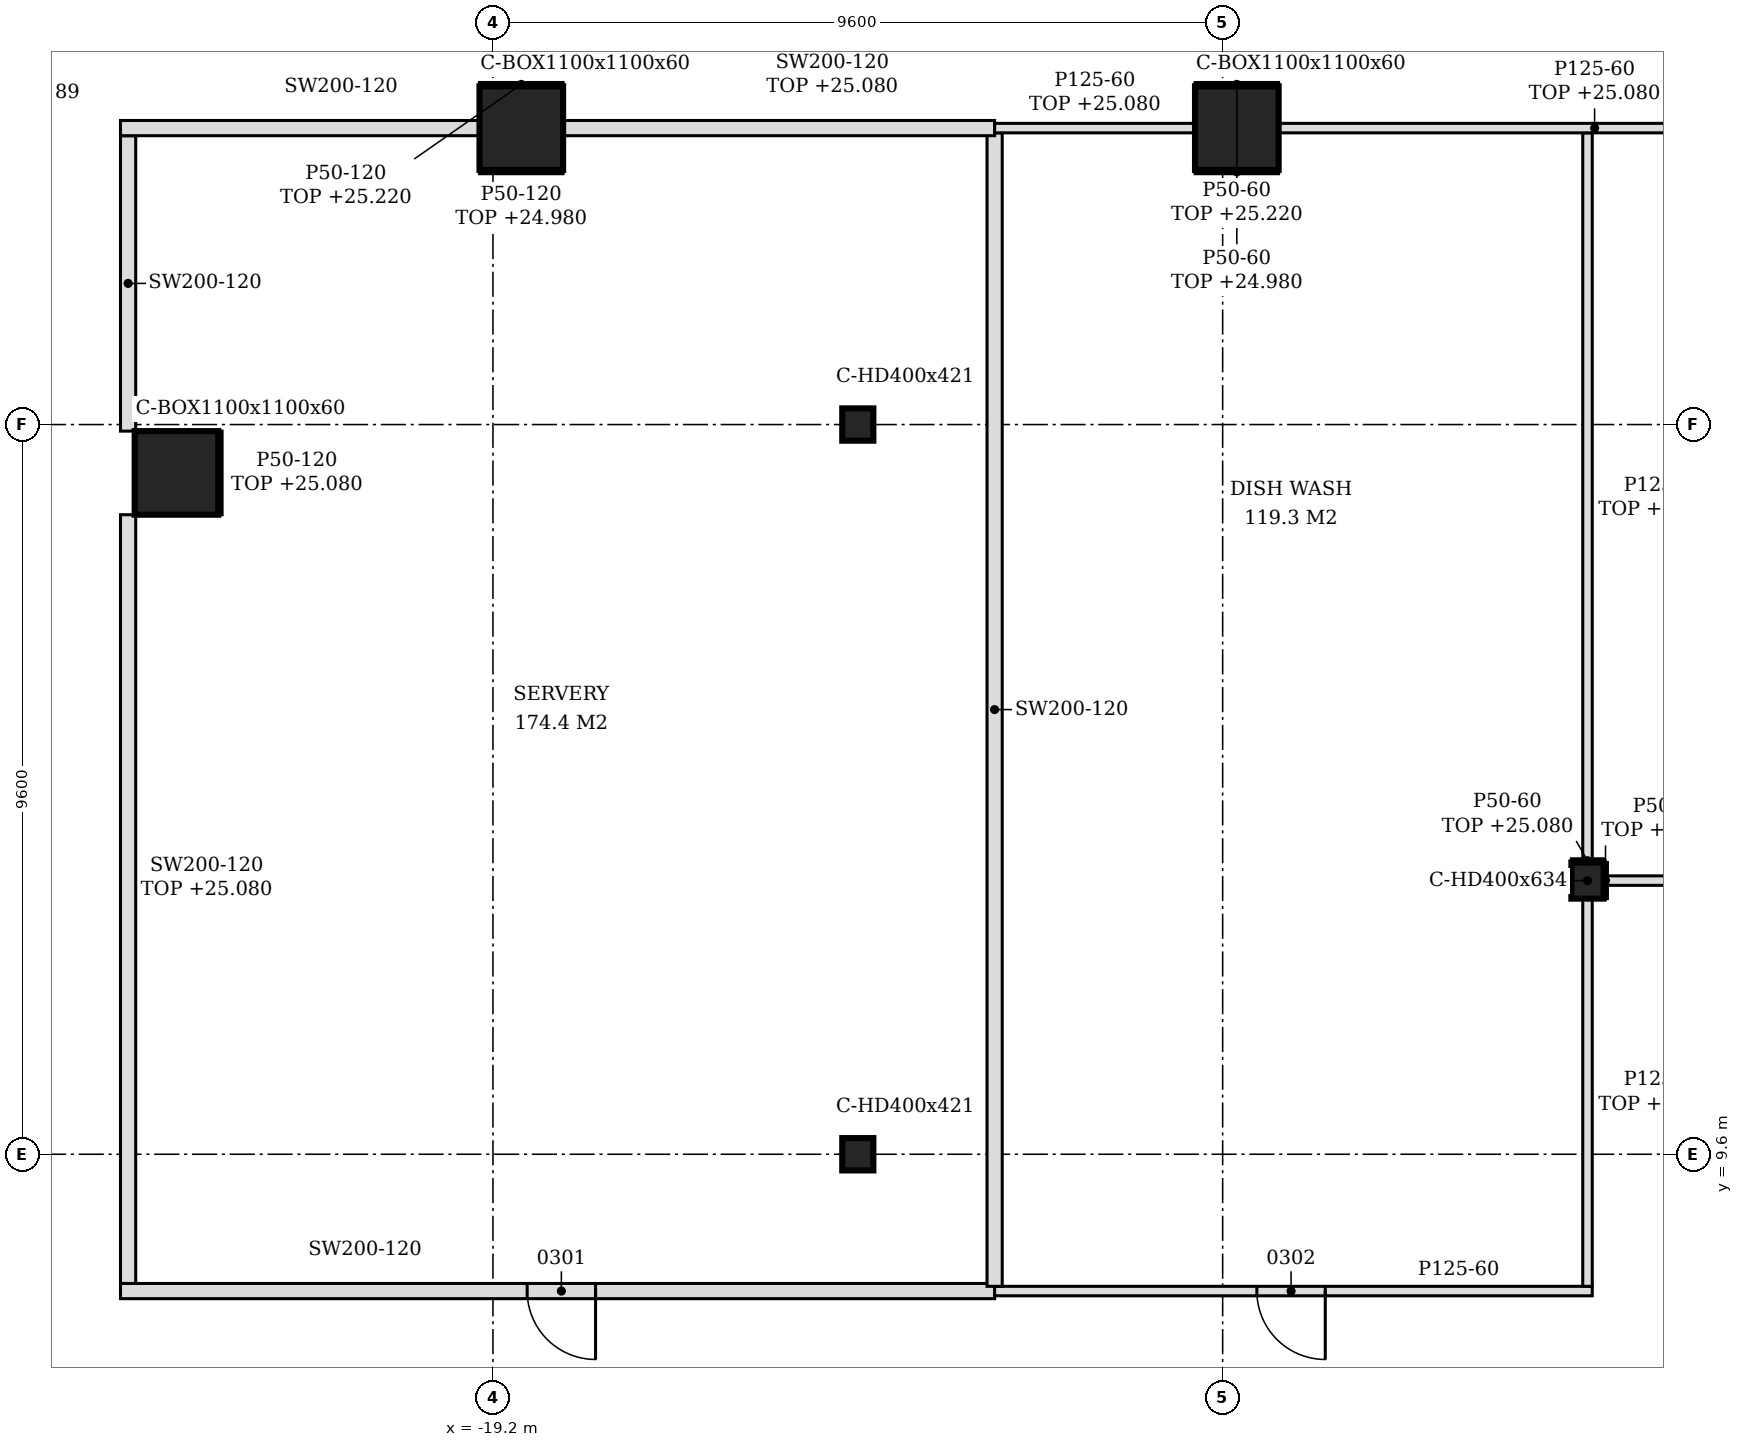
"""IFC4 building model, lengths in metres.
Left out: names, types, materials, properties, quantities, classifications, styles, units other than length and angle.
Written with IfcOpenShell. Run it as: python <this file> out.ifc"""

import sys

from ifc_helpers import new_model, si_unit, direction, frame, frame_2d, origin, origin_2d, place, context, subcontext, project, spatial, polyline, rectangle, hollow_rectangle, i_section, outline, extrude, element, fill, save


model = new_model("IFC4")
c1 = context("Model", 3, precision=1e-05, world=origin(), true_north=direction((0.0, 1.0)))
c2 = subcontext(c1, "Body", "Model", "MODEL_VIEW")
j1 = project(units=[si_unit("LENGTHUNIT", "METRE"), si_unit("PLANEANGLEUNIT", "RADIAN")], contexts=[c1])
p1 = place(None, origin())
s1 = spatial("IfcSite", under=j1, at=p1, CompositionType="ELEMENT")
p2 = place(p1, origin())
s2 = spatial("IfcBuilding", under=s1, at=p2, CompositionType="ELEMENT")
p3 = place(p2, frame((0.0, 0.0, 21.0)))
s3 = spatial("IfcBuildingStorey", under=s2, at=p3, CompositionType="ELEMENT", Elevation=21.0)
for number, where, z_axis, x_axis in (
    (1, (-9.414, 23.1, -0.2), (0.0, 0.0, 1.0), (1.0, 0.0, 0.0)),
    (2, (-18.827, 23.1, -0.2), (0.0, 0.0, 1.0), (1.0, 0.0, 0.0)),
    (3, (-23.364, 18.564, -0.2), (0.0, 0.0, 1.0), (1.0, 0.0, 0.0)),
):
    element("IfcColumn", number, at=place(p3, frame(where, z_axis=z_axis, x_axis=x_axis)), inside=s3, PredefinedType="COLUMN", context=c2, shape_type="SweptSolid", body=[
        extrude(hollow_rectangle(XDim=1.1, YDim=1.1, WallThickness=0.06, at=origin_2d()), origin(), (0.0, 0.0, 1.0), 4.8),
    ])
p4 = place(p3, frame((-4.8, 13.2, -0.2), z_axis=(0.0, 0.0, 1.0), x_axis=(1.0, 0.0, 0.0)))
e4 = element("IfcColumn", 4, at=p4, inside=s3, PredefinedType="COLUMN", context=c2, shape_type="SweptSolid", body=[
    extrude(i_section(OverallWidth=0.424, OverallDepth=0.474, WebThickness=0.048, FlangeThickness=0.077, FilletRadius=0.015, at=origin_2d()), origin(), (0.0, 0.0, 1.0), 4.8),
])
for number, where, z_axis, x_axis in (
    (5, (-14.4, 9.6, -0.2), (0.0, 0.0, 1.0), (1.0, 0.0, 0.0)),
    (6, (-14.4, 19.2, -0.2), (0.0, 0.0, 1.0), (1.0, 0.0, 0.0)),
):
    element("IfcColumn", number, at=place(p3, frame(where, z_axis=z_axis, x_axis=x_axis)), inside=s3, PredefinedType="COLUMN", context=c2, shape_type="SweptSolid", body=[
        extrude(i_section(OverallWidth=0.409, OverallDepth=0.425, WebThickness=0.033, FlangeThickness=0.052, FilletRadius=0.015, at=origin_2d()), origin(), (0.0, 0.0, 1.0), 4.8),
    ])
p5 = place(p3, frame((-24.1, 7.8, 0.0), z_axis=(0.0, 0.0, 1.0), x_axis=(1.0, 0.0, 0.0)))
e7 = element("IfcWall", 7, at=p5, inside=s3, PredefinedType="PARTITIONING", context=c2, shape_type="SweptSolid", body=[
    extrude(outline(polyline([(0.0, 0.0), (11.5, 0.0), (11.5, 4.6), (9.8, 4.6), (9.798, 4.08), (9.6, 4.08), (9.598, 4.6), (5.0, 4.6), (4.998, 4.08), (4.8, 4.08), (4.798, 4.6), (0.2, 4.6), (0.198, 4.08), (0.0, 4.08), (0.0, 0.0)])), frame((0.0, 0.1, 0.0), z_axis=(0.0, -1.0, 0.0), x_axis=(1.0, 0.0, 0.0)), (0.0, 0.0, 1.0), 0.2),
])
p6 = place(p5, frame((5.35, 0.0, 0.0)))
e8 = element("IfcOpeningElement", 8, at=p6, cuts=e7, PredefinedType="OPENING", context=c2, shape_type="SweptSolid", body=[
    extrude(rectangle(XDim=0.9, YDim=2.1, at=frame_2d((0.45, 1.05))), frame((0.0, 0.11, 0.0), z_axis=(0.0, -1.0, 0.0), x_axis=(1.0, 0.0, 0.0)), (0.0, 0.0, 1.0), 0.22),
])
p7 = place(p3, frame((-12.6, 7.8, 0.0), z_axis=(0.0, 0.0, 1.0), x_axis=(1.0, 0.0, 0.0)))
e9 = element("IfcWall", 9, at=p7, inside=s3, PredefinedType="PARTITIONING", context=c2, shape_type="SweptSolid", body=[
    extrude(outline(polyline([(0.0, 0.0), (7.863, 0.0), (7.863, 3.98), (7.65, 3.98), (7.648, 4.6), (3.1, 4.6), (3.098, 4.08), (2.9, 4.08), (2.898, 4.6), (0.0, 4.6), (0.0, 0.0)])), frame((0.0, 0.062, 0.0), z_axis=(0.0, -1.0, 0.0), x_axis=(1.0, 0.0, 0.0)), (0.0, 0.0, 1.0), 0.125),
])
p8 = place(p7, frame((3.45, 0.0, 0.0)))
e10 = element("IfcOpeningElement", 10, at=p8, cuts=e9, PredefinedType="OPENING", context=c2, shape_type="SweptSolid", body=[
    extrude(rectangle(XDim=0.9, YDim=2.1, at=frame_2d((0.45, 1.05))), frame((0.0, 0.073, 0.0), z_axis=(0.0, -1.0, 0.0), x_axis=(1.0, 0.0, 0.0)), (0.0, 0.0, 1.0), 0.145),
])
p9 = place(p3, frame((-24.0, 7.9, 0.0), z_axis=(0.0, 0.0, 1.0), x_axis=(0.0, 1.0, 0.0)))
e11 = element("IfcWall", 11, at=p9, inside=s3, PredefinedType="PARTITIONING", context=c2, shape_type="SweptSolid", body=[
    extrude(outline(polyline([(0.0, 0.0), (10.114, 0.0), (10.114, 4.08), (1.85, 4.08), (1.848, 3.88), (1.55, 3.88), (1.548, 4.08), (0.0, 4.08), (0.0, 0.0)])), frame((0.0, 0.1, 0.0), z_axis=(0.0, -1.0, 0.0), x_axis=(1.0, 0.0, 0.0)), (0.0, 0.0, 1.0), 0.2),
])
p10 = place(p3, frame((-12.6, 7.863, 0.0), z_axis=(0.0, 0.0, 1.0), x_axis=(0.0, 1.0, 0.0)))
e12 = element("IfcWall", 12, at=p10, inside=s3, PredefinedType="PARTITIONING", context=c2, shape_type="SweptSolid", body=[
    extrude(outline(polyline([(0.0, 0.0), (15.175, 0.0), (15.175, 4.08), (15.087, 4.08), (15.085, 4.6), (1.887, 4.6), (1.885, 4.08), (1.587, 4.08), (1.585, 4.6), (0.0, 4.6), (0.0, 0.0)])), frame((0.0, 0.1, 0.0), z_axis=(0.0, -1.0, 0.0), x_axis=(1.0, 0.0, 0.0)), (0.0, 0.0, 1.0), 0.2),
])
p11 = place(p3, frame((-4.8, 7.863, 0.0), z_axis=(0.0, 0.0, 1.0), x_axis=(0.0, 1.0, 0.0)))
e13 = element("IfcWall", 13, at=p11, inside=s3, PredefinedType="PARTITIONING", context=c2, shape_type="SweptSolid", body=[
    extrude(rectangle(XDim=5.1, YDim=0.125, at=frame_2d((2.55, 0.0))), origin(), (0.0, 0.0, 1.0), 3.98),
])
p12 = place(p3, frame((-4.588, 13.2, 0.0), z_axis=(0.0, 0.0, 1.0), x_axis=(1.0, 0.0, 0.0)))
e14 = element("IfcWall", 14, at=p12, inside=s3, PredefinedType="PARTITIONING", context=c2, shape_type="SweptSolid", body=[
    extrude(rectangle(XDim=11.576, YDim=0.125, at=frame_2d((5.788, 0.0))), origin(), (0.0, 0.0, 1.0), 3.98),
])
p13 = place(p12, frame((4.138, 0.0, 0.0)))
e15 = element("IfcOpeningElement", 15, at=p13, cuts=e14, PredefinedType="OPENING", context=c2, shape_type="SweptSolid", body=[
    extrude(rectangle(XDim=0.9, YDim=2.1, at=frame_2d((0.45, 1.05))), frame((0.0, 0.073, 0.0), z_axis=(0.0, -1.0, 0.0), x_axis=(1.0, 0.0, 0.0)), (0.0, 0.0, 1.0), 0.145),
])
p14 = place(p12, frame((10.143, 0.0, 0.0)))
e16 = element("IfcOpeningElement", 16, at=p14, cuts=e14, PredefinedType="OPENING", context=c2, shape_type="SweptSolid", body=[
    extrude(rectangle(XDim=0.9, YDim=2.1, at=frame_2d((0.45, 1.05))), frame((0.0, 0.073, 0.0), z_axis=(0.0, -1.0, 0.0), x_axis=(1.0, 0.0, 0.0)), (0.0, 0.0, 1.0), 0.145),
])
p15 = place(p3, frame((-4.8, 13.437, 0.0), z_axis=(0.0, 0.0, 1.0), x_axis=(0.0, 1.0, 0.0)))
e17 = element("IfcWall", 17, at=p15, inside=s3, PredefinedType="PARTITIONING", context=c2, shape_type="SweptSolid", body=[
    extrude(rectangle(XDim=9.601, YDim=0.125, at=frame_2d((4.8, 0.0))), origin(), (0.0, 0.0, 1.0), 4.08),
])
p16 = place(p3, frame((-24.0, 19.114, 0.0), z_axis=(0.0, 0.0, 1.0), x_axis=(0.0, 1.0, 0.0)))
e18 = element("IfcWall", 18, at=p16, inside=s3, PredefinedType="PARTITIONING", context=c2, shape_type="SweptSolid", body=[
    extrude(outline(polyline([(0.0, 0.0), (3.886, 0.0), (3.886, 4.6), (0.236, 4.6), (0.234, 3.98), (0.0, 3.98), (0.0, 0.0)])), frame((0.0, 0.1, 0.0), z_axis=(0.0, -1.0, 0.0), x_axis=(1.0, 0.0, 0.0)), (0.0, 0.0, 1.0), 0.2),
])
p17 = place(p3, frame((-24.1, 23.1, 0.0), z_axis=(0.0, 0.0, 1.0), x_axis=(1.0, 0.0, 0.0)))
e19 = element("IfcWall", 19, at=p17, inside=s3, PredefinedType="PARTITIONING", context=c2, shape_type="SweptSolid", body=[
    extrude(rectangle(XDim=4.723, YDim=0.2, at=frame_2d((2.361, 0.0))), origin(), (0.0, 0.0, 1.0), 4.6),
])
p18 = place(p3, frame((-18.277, 23.1, 0.0), z_axis=(0.0, 0.0, 1.0), x_axis=(1.0, 0.0, 0.0)))
e20 = element("IfcWall", 20, at=p18, inside=s3, PredefinedType="PARTITIONING", context=c2, shape_type="SweptSolid", body=[
    extrude(rectangle(XDim=5.677, YDim=0.2, at=frame_2d((2.838, 0.0))), origin(), (0.0, 0.0, 1.0), 4.08),
])
p19 = place(p3, frame((-12.6, 23.1, 0.0), z_axis=(0.0, 0.0, 1.0), x_axis=(1.0, 0.0, 0.0)))
e21 = element("IfcWall", 21, at=p19, inside=s3, PredefinedType="PARTITIONING", context=c2, shape_type="SweptSolid", body=[
    extrude(rectangle(XDim=2.636, YDim=0.125, at=frame_2d((1.318, 0.0))), origin(), (0.0, 0.0, 1.0), 4.08),
])
p20 = place(p3, frame((-8.864, 23.1, 0.0), z_axis=(0.0, 0.0, 1.0), x_axis=(1.0, 0.0, 0.0)))
e22 = element("IfcWall", 22, at=p20, inside=s3, PredefinedType="PARTITIONING", context=c2, shape_type="SweptSolid", body=[
    extrude(rectangle(XDim=8.313, YDim=0.125, at=frame_2d((4.157, 0.0))), origin(), (0.0, 0.0, 1.0), 4.08),
])
p21 = place(p3, frame((-22.789, 18.014, 0.0), z_axis=(0.0, 0.0, 1.0), x_axis=(0.0, 1.0, 0.0)))
e23 = element("IfcWall", 23, at=p21, inside=s3, PredefinedType="PARTITIONING", context=c2, shape_type="SweptSolid", body=[
    extrude(rectangle(XDim=1.1, YDim=0.05, at=frame_2d((0.55, 0.0))), origin(), (0.0, 0.0, 1.0), 4.08),
])
p22 = place(p3, frame((-4.563, 12.963, 0.0), z_axis=(0.0, 0.0, 1.0), x_axis=(0.0, 1.0, 0.0)))
e24 = element("IfcWall", 24, at=p22, inside=s3, PredefinedType="PARTITIONING", context=c2, shape_type="SweptSolid", body=[
    extrude(rectangle(XDim=0.474, YDim=0.05, at=frame_2d((0.237, 0.0))), origin(), (0.0, 0.0, 1.0), 3.98),
])
p23 = place(p3, frame((-5.012, 13.462, 0.0), z_axis=(0.0, 0.0, 1.0), x_axis=(1.0, 0.0, 0.0)))
e25 = element("IfcWall", 25, at=p23, inside=s3, PredefinedType="PARTITIONING", context=c2, shape_type="SweptSolid", body=[
    extrude(rectangle(XDim=0.424, YDim=0.05, at=frame_2d((0.212, 0.0))), origin(), (0.0, 0.0, 1.0), 4.08),
])
p24 = place(p3, frame((-19.377, 22.525, 0.0), z_axis=(0.0, 0.0, 1.0), x_axis=(1.0, 0.0, 0.0)))
e26 = element("IfcWall", 26, at=p24, inside=s3, PredefinedType="PARTITIONING", context=c2, shape_type="SweptSolid", body=[
    extrude(rectangle(XDim=1.1, YDim=0.05, at=frame_2d((0.55, 0.0))), origin(), (0.0, 0.0, 1.0), 3.98),
])
for number, where, z_axis, x_axis in (
    (27, (-19.377, 23.675, 0.0), (0.0, 0.0, 1.0), (1.0, 0.0, 0.0)),
    (28, (-9.964, 23.675, 0.0), (0.0, 0.0, 1.0), (1.0, 0.0, 0.0)),
):
    element("IfcWall", number, at=place(p3, frame(where, z_axis=z_axis, x_axis=x_axis)), inside=s3, PredefinedType="PARTITIONING", context=c2, shape_type="SweptSolid", body=[
        extrude(rectangle(XDim=1.1, YDim=0.05, at=frame_2d((0.55, 0.0))), origin(), (0.0, 0.0, 1.0), 4.22),
    ])
p25 = place(p3, frame((-9.964, 22.525, 0.0), z_axis=(0.0, 0.0, 1.0), x_axis=(1.0, 0.0, 0.0)))
e29 = element("IfcWall", 29, at=p25, inside=s3, PredefinedType="PARTITIONING", context=c2, shape_type="SweptSolid", body=[
    extrude(rectangle(XDim=1.1, YDim=0.05, at=frame_2d((0.55, 0.0))), origin(), (0.0, 0.0, 1.0), 3.98),
])
p26 = place(p6, frame((0.9, 0.0, 0.0), z_axis=(0.0, 0.0, 1.0), x_axis=(-1.0, 0.0, 0.0)))
e30 = element("IfcDoor", 30, at=p26, inside=s3, OperationType="SINGLE_SWING_LEFT", PredefinedType="DOOR", context=c2, shape_type="SweptSolid", body=[
    extrude(rectangle(XDim=0.9, YDim=2.1, at=frame_2d((0.45, 1.05))), frame((0.0, 0.025, 0.0), z_axis=(0.0, -1.0, 0.0), x_axis=(1.0, 0.0, 0.0)), (0.0, 0.0, 1.0), 0.05),
])
fill(e8, e30)
p27 = place(p8, frame((0.9, 0.0, 0.0), z_axis=(0.0, 0.0, 1.0), x_axis=(-1.0, 0.0, 0.0)))
e31 = element("IfcDoor", 31, at=p27, inside=s3, OperationType="SINGLE_SWING_LEFT", PredefinedType="DOOR", context=c2, shape_type="SweptSolid", body=[
    extrude(rectangle(XDim=0.9, YDim=2.1, at=frame_2d((0.45, 1.05))), frame((0.0, 0.025, 0.0), z_axis=(0.0, -1.0, 0.0), x_axis=(1.0, 0.0, 0.0)), (0.0, 0.0, 1.0), 0.05),
])
fill(e10, e31)
save(model, sys.argv[1])
